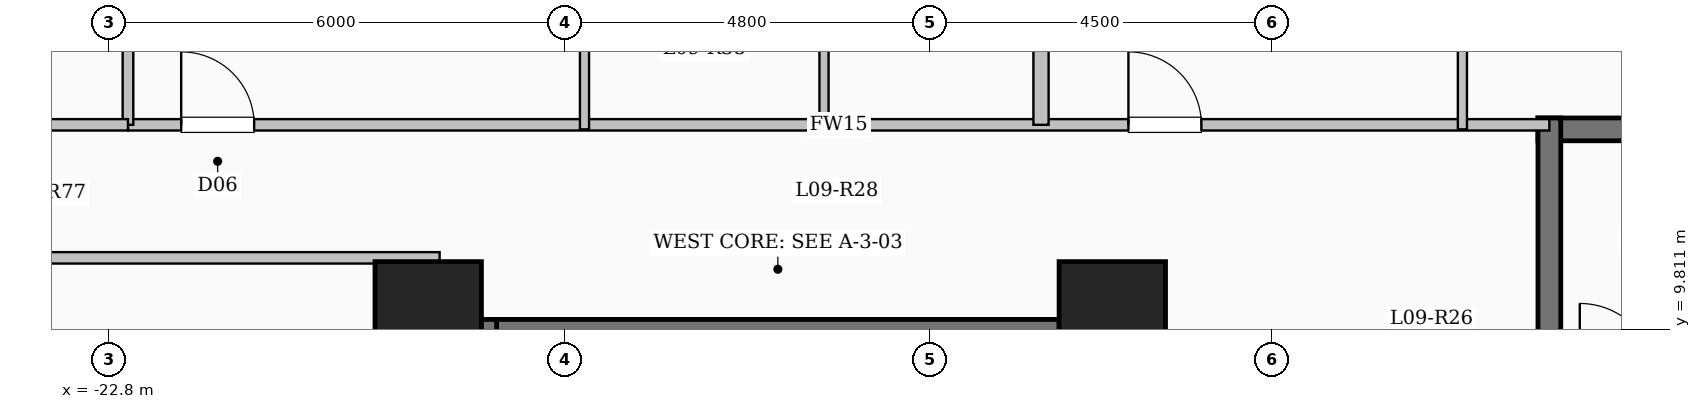
"""IFC4 building model, lengths in metres.
Left out: names, types, materials, properties, quantities, classifications, styles, units other than length and angle.
Written with IfcOpenShell. Run it as: python <this file> out.ifc"""

import sys

from ifc_helpers import new_model, si_unit, direction, frame, frame_2d, origin, origin_2d, place, context, subcontext, project, spatial, rectangle, extrude, element, fill, save


model = new_model("IFC4")
c1 = context("Model", 3, precision=1e-05, world=origin(), true_north=direction((0.0, 1.0)))
c2 = subcontext(c1, "Body", "Model", "MODEL_VIEW")
j1 = project(units=[si_unit("LENGTHUNIT", "METRE"), si_unit("PLANEANGLEUNIT", "RADIAN")], contexts=[c1])
p1 = place(None, origin())
s1 = spatial("IfcSite", under=j1, at=p1, CompositionType="ELEMENT")
p2 = place(p1, origin())
s2 = spatial("IfcBuilding", under=s1, at=p2, CompositionType="ELEMENT")
p3 = place(p2, frame((0.0, 0.0, 37.4)))
s3 = spatial("IfcBuildingStorey", under=s2, at=p3, CompositionType="ELEMENT", Elevation=37.4)
for number, where, z_axis, x_axis in (
    (1, (-9.6, 10.0, 0.0), (0.0, 0.0, 1.0), (1.0, 0.0, 0.0)),
    (2, (-18.6, 10.0, 0.0), (0.0, 0.0, 1.0), (1.0, 0.0, 0.0)),
):
    element("IfcColumn", number, at=place(p3, frame(where, z_axis=z_axis, x_axis=x_axis)), inside=s3, PredefinedType="COLUMN", context=c2, shape_type="SweptSolid", body=[
        extrude(rectangle(XDim=1.4, YDim=1.4, at=origin_2d()), origin(), (0.0, 0.0, 1.0), 3.35),
    ])
p4 = place(p3, frame((-18.0, 9.79, 0.0), z_axis=(0.0, 0.0, 1.0), x_axis=(1.0, 0.0, 0.0)))
e3 = element("IfcWall", 3, at=p4, inside=s3, PredefinedType="SHEAR", context=c2, shape_type="SweptSolid", body=[
    extrude(rectangle(XDim=8.0, YDim=0.3, at=frame_2d((4.0, 0.0))), origin(), (0.0, 0.0, 1.0), 3.35),
])
for number, where, z_axis, x_axis in (
    (4, (-17.85, 6.35, 0.0), (0.0, 0.0, 1.0), (0.0, 1.0, 0.0)),
    (5, (-10.15, 6.35, 0.0), (0.0, 0.0, 1.0), (0.0, 1.0, 0.0)),
):
    element("IfcWall", number, at=place(p3, frame(where, z_axis=z_axis, x_axis=x_axis)), inside=s3, PredefinedType="SHEAR", context=c2, shape_type="SweptSolid", body=[
        extrude(rectangle(XDim=3.59, YDim=0.3, at=frame_2d((1.795, 0.0))), origin(), (0.0, 0.0, 1.0), 3.35),
    ])
p5 = place(p3, frame((-4.0, 12.44, 0.0), z_axis=(0.0, 0.0, 1.0), x_axis=(1.0, 0.0, 0.0)))
e6 = element("IfcWall", 6, at=p5, inside=s3, PredefinedType="SHEAR", context=c2, shape_type="SweptSolid", body=[
    extrude(rectangle(XDim=8.0, YDim=0.3, at=frame_2d((4.0, 0.0))), origin(), (0.0, 0.0, 1.0), 3.35),
])
p6 = place(p3, frame((-3.85, 9.0, 0.0), z_axis=(0.0, 0.0, 1.0), x_axis=(0.0, 1.0, 0.0)))
e7 = element("IfcWall", 7, at=p6, inside=s3, PredefinedType="SHEAR", context=c2, shape_type="SweptSolid", body=[
    extrude(rectangle(XDim=3.59, YDim=0.3, at=frame_2d((1.795, 0.0))), origin(), (0.0, 0.0, 1.0), 3.35),
])
p7 = place(p3, frame((-22.55, 12.5, 0.0), z_axis=(0.0, 0.0, 1.0), x_axis=(1.0, 0.0, 0.0)))
e8 = element("IfcWall", 8, at=p7, inside=s3, PredefinedType="PARTITIONING", context=c2, shape_type="SweptSolid", body=[
    extrude(rectangle(XDim=18.7, YDim=0.15, at=frame_2d((9.35, 0.0))), origin(), (0.0, 0.0, 1.0), 3.1),
])
p8 = place(p7, frame((0.7, 0.0, 0.0)))
e9 = element("IfcOpeningElement", 9, at=p8, cuts=e8, PredefinedType="OPENING", context=c2, shape_type="SweptSolid", body=[
    extrude(rectangle(XDim=0.96, YDim=2.15, at=frame_2d((0.48, 1.075))), frame((0.0, 0.085, 0.0), z_axis=(0.0, -1.0, 0.0), x_axis=(1.0, 0.0, 0.0)), (0.0, 0.0, 1.0), 0.17),
])
p9 = place(p7, frame((13.162, 0.0, 0.0)))
e10 = element("IfcOpeningElement", 10, at=p9, cuts=e8, PredefinedType="OPENING", context=c2, shape_type="SweptSolid", body=[
    extrude(rectangle(XDim=0.96, YDim=2.15, at=frame_2d((0.48, 1.075))), frame((0.0, 0.085, 0.0), z_axis=(0.0, -1.0, 0.0), x_axis=(1.0, 0.0, 0.0)), (0.0, 0.0, 1.0), 0.17),
])
p10 = place(p3, frame((-10.538, 12.5, 0.0), z_axis=(0.0, 0.0, 1.0), x_axis=(0.0, 1.0, 0.0)))
e11 = element("IfcWall", 11, at=p10, inside=s3, PredefinedType="SOLIDWALL", context=c2, shape_type="SweptSolid", body=[
    extrude(rectangle(XDim=11.214, YDim=0.2, at=frame_2d((5.607, 0.0))), origin(), (0.0, 0.0, 1.0), 3.1),
])
p11 = place(p3, frame((-16.544, 12.44, 0.0), z_axis=(0.0, 0.0, 1.0), x_axis=(0.0, 1.0, 0.0)))
e12 = element("IfcWall", 12, at=p11, inside=s3, PredefinedType="PARTITIONING", context=c2, shape_type="SweptSolid", body=[
    extrude(rectangle(XDim=11.16, YDim=0.12, at=frame_2d((5.58, 0.0))), origin(), (0.0, 0.0, 1.0), 3.1),
])
p12 = place(p11, frame((2.905, 0.0, 0.0)))
e13 = element("IfcOpeningElement", 13, at=p12, cuts=e12, PredefinedType="OPENING", context=c2, shape_type="SweptSolid", body=[
    extrude(rectangle(XDim=1.08, YDim=2.15, at=frame_2d((0.54, 1.075))), frame((0.0, 0.07, 0.0), z_axis=(0.0, -1.0, 0.0), x_axis=(1.0, 0.0, 0.0)), (0.0, 0.0, 1.0), 0.14),
])
p13 = place(p3, frame((-13.393, 12.44, 0.0), z_axis=(0.0, 0.0, 1.0), x_axis=(0.0, 1.0, 0.0)))
e14 = element("IfcWall", 14, at=p13, inside=s3, PredefinedType="PARTITIONING", context=c2, shape_type="SweptSolid", body=[
    extrude(rectangle(XDim=2.62, YDim=0.12, at=frame_2d((1.31, 0.0))), origin(), (0.0, 0.0, 1.0), 3.1),
])
p14 = place(p3, frame((-4.994, 12.44, 0.0), z_axis=(0.0, 0.0, 1.0), x_axis=(0.0, 1.0, 0.0)))
e15 = element("IfcWall", 15, at=p14, inside=s3, PredefinedType="PARTITIONING", context=c2, shape_type="SweptSolid", body=[
    extrude(rectangle(XDim=12.64, YDim=0.12, at=frame_2d((6.32, 0.0))), origin(), (0.0, 0.0, 1.0), 3.1),
])
p15 = place(p14, frame((3.075, 0.0, 0.0)))
e16 = element("IfcOpeningElement", 16, at=p15, cuts=e15, PredefinedType="OPENING", context=c2, shape_type="SweptSolid", body=[
    extrude(rectangle(XDim=1.08, YDim=2.15, at=frame_2d((0.54, 1.075))), frame((0.0, 0.07, 0.0), z_axis=(0.0, -1.0, 0.0), x_axis=(1.0, 0.0, 0.0)), (0.0, 0.0, 1.0), 0.14),
])
p16 = place(p3, frame((-28.68, 10.75, 0.0), z_axis=(0.0, 0.0, 1.0), x_axis=(1.0, 0.0, 0.0)))
e17 = element("IfcWall", 17, at=p16, inside=s3, PredefinedType="PARTITIONING", context=c2, shape_type="SweptSolid", body=[
    extrude(rectangle(XDim=10.23, YDim=0.15, at=frame_2d((5.115, 0.0))), origin(), (0.0, 0.0, 1.0), 3.1),
])
p17 = place(p3, frame((-22.55, 12.5, 0.0), z_axis=(0.0, 0.0, 1.0), x_axis=(0.0, 1.0, 0.0)))
e18 = element("IfcWall", 18, at=p17, inside=s3, PredefinedType="PARTITIONING", context=c2, shape_type="SweptSolid", body=[
    extrude(rectangle(XDim=6.55, YDim=0.14, at=frame_2d((3.275, 0.0))), origin(), (0.0, 0.0, 1.0), 3.1),
])
p18 = place(p3, frame((-28.68, 12.5, 0.0), z_axis=(0.0, 0.0, 1.0), x_axis=(1.0, 0.0, 0.0)))
e19 = element("IfcWall", 19, at=p18, inside=s3, PredefinedType="PARTITIONING", context=c2, shape_type="SweptSolid", body=[
    extrude(rectangle(XDim=6.13, YDim=0.15, at=frame_2d((3.065, 0.0))), origin(), (0.0, 0.0, 1.0), 3.1),
])
p19 = place(p18, frame((2.59, 0.0, 0.0)))
e20 = element("IfcOpeningElement", 20, at=p19, cuts=e19, PredefinedType="OPENING", context=c2, shape_type="SweptSolid", body=[
    extrude(rectangle(XDim=0.95, YDim=2.15, at=frame_2d((0.475, 1.075))), frame((0.0, 0.085, 0.0), z_axis=(0.0, -1.0, 0.0), x_axis=(1.0, 0.0, 0.0)), (0.0, 0.0, 1.0), 0.17),
])
p20 = place(p8, origin())
e21 = element("IfcDoor", 21, at=p20, inside=s3, OperationType="SINGLE_SWING_LEFT", PredefinedType="DOOR", context=c2, shape_type="SweptSolid", body=[
    extrude(rectangle(XDim=0.96, YDim=2.15, at=frame_2d((0.48, 1.075))), frame((0.0, 0.025, 0.0), z_axis=(0.0, -1.0, 0.0), x_axis=(1.0, 0.0, 0.0)), (0.0, 0.0, 1.0), 0.05),
])
fill(e9, e21)
p21 = place(p9, origin())
e22 = element("IfcDoor", 22, at=p21, inside=s3, OperationType="SINGLE_SWING_LEFT", PredefinedType="DOOR", context=c2, shape_type="SweptSolid", body=[
    extrude(rectangle(XDim=0.96, YDim=2.15, at=frame_2d((0.48, 1.075))), frame((0.0, 0.025, 0.0), z_axis=(0.0, -1.0, 0.0), x_axis=(1.0, 0.0, 0.0)), (0.0, 0.0, 1.0), 0.05),
])
fill(e10, e22)
save(model, sys.argv[1])
